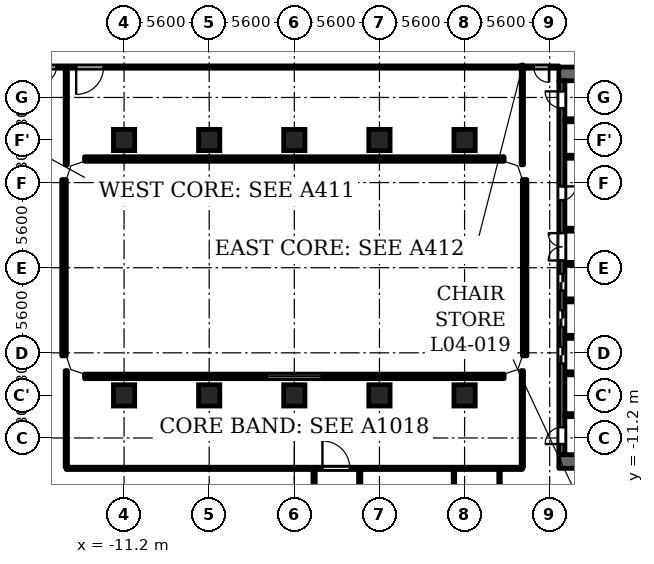
"""IFC4 building model, lengths in metres.
Left out: names, types, materials, properties, quantities, classifications, styles, units other than length and angle.
Written with IfcOpenShell. Run it as: python <this file> out.ifc"""

import sys

from ifc_helpers import new_model, si_unit, direction, frame, frame_2d, origin, origin_2d, place, context, subcontext, project, spatial, polyline, rectangle, outline, extrude, element, fill, save


model = new_model("IFC4")
c1 = context("Model", 3, precision=1e-05, world=origin(), true_north=direction((0.0, 1.0)))
c2 = subcontext(c1, "Body", "Model", "MODEL_VIEW")
j1 = project(units=[si_unit("LENGTHUNIT", "METRE"), si_unit("PLANEANGLEUNIT", "RADIAN")], contexts=[c1])
p1 = place(None, origin())
s1 = spatial("IfcSite", under=j1, at=p1, CompositionType="ELEMENT")
p2 = place(p1, origin())
s2 = spatial("IfcBuilding", under=s1, at=p2, CompositionType="ELEMENT")
p3 = place(p2, frame((0.0, 0.0, 20.9)))
s3 = spatial("IfcBuildingStorey", under=s2, at=p3, CompositionType="ELEMENT", Elevation=20.9)
for number, where, z_axis, x_axis in (
    (1, (-11.2, -8.4, 0.0), (0.0, 0.0, 1.0), (1.0, 0.0, 0.0)),
    (2, (-11.2, 8.4, 0.0), (0.0, 0.0, 1.0), (1.0, 0.0, 0.0)),
    (3, (-5.6, -8.4, 0.0), (0.0, 0.0, 1.0), (1.0, 0.0, 0.0)),
    (4, (-5.6, 8.4, 0.0), (0.0, 0.0, 1.0), (1.0, 0.0, 0.0)),
    (5, (0.0, -8.4, 0.0), (0.0, 0.0, 1.0), (1.0, 0.0, 0.0)),
    (6, (0.0, 8.4, 0.0), (0.0, 0.0, 1.0), (1.0, 0.0, 0.0)),
    (7, (5.6, -8.4, 0.0), (0.0, 0.0, 1.0), (1.0, 0.0, 0.0)),
    (8, (5.6, 8.4, 0.0), (0.0, 0.0, 1.0), (1.0, 0.0, 0.0)),
    (9, (11.2, -8.4, 0.0), (0.0, 0.0, 1.0), (1.0, 0.0, 0.0)),
    (10, (11.2, 8.4, 0.0), (0.0, 0.0, 1.0), (1.0, 0.0, 0.0)),
):
    element("IfcColumn", number, at=place(p3, frame(where, z_axis=z_axis, x_axis=x_axis)), inside=s3, PredefinedType="COLUMN", context=c2, shape_type="SweptSolid", body=[
        extrude(rectangle(XDim=1.4, YDim=1.4, at=origin_2d()), origin(), (0.0, 0.0, 1.0), 4.8),
    ])
p4 = place(p3, frame((-15.15, -5.8, 0.0), z_axis=(0.0, 0.0, 1.0), x_axis=(0.0, 1.0, 0.0)))
e11 = element("IfcWall", 11, at=p4, inside=s3, PredefinedType="SOLIDWALL", context=c2, shape_type="SweptSolid", body=[
    extrude(rectangle(XDim=11.6, YDim=0.3, at=frame_2d((5.8, 0.0))), origin(), (0.0, 0.0, 1.0), 4.45),
])
p5 = place(p3, frame((-13.8, 7.15, 0.0), z_axis=(0.0, 0.0, 1.0), x_axis=(1.0, 0.0, 0.0)))
e12 = element("IfcWall", 12, at=p5, inside=s3, PredefinedType="SOLIDWALL", context=c2, shape_type="SweptSolid", body=[
    extrude(rectangle(XDim=27.6, YDim=0.3, at=frame_2d((13.8, 0.0))), origin(), (0.0, 0.0, 1.0), 4.45),
])
p6 = place(p3, frame((15.15, 5.8, 0.0), z_axis=(0.0, 0.0, 1.0), x_axis=(0.0, -1.0, 0.0)))
e13 = element("IfcWall", 13, at=p6, inside=s3, PredefinedType="SOLIDWALL", context=c2, shape_type="SweptSolid", body=[
    extrude(rectangle(XDim=11.6, YDim=0.3, at=frame_2d((5.8, 0.0))), origin(), (0.0, 0.0, 1.0), 4.45),
])
p7 = place(p3, frame((13.8, -7.15, 0.0), z_axis=(0.0, 0.0, 1.0), x_axis=(-1.0, 0.0, 0.0)))
e14 = element("IfcWall", 14, at=p7, inside=s3, PredefinedType="SOLIDWALL", context=c2, shape_type="SweptSolid", body=[
    extrude(rectangle(XDim=27.6, YDim=0.3, at=frame_2d((13.8, 0.0))), origin(), (0.0, 0.0, 1.0), 4.45),
])
p8 = place(p7, frame((12.0, 0.0, 1.2)))
e15 = element("IfcOpeningElement", 15, at=p8, cuts=e14, PredefinedType="OPENING", context=c2, shape_type="SweptSolid", body=[
    extrude(rectangle(XDim=3.6, YDim=0.95, at=frame_2d((1.8, 0.475))), frame((0.0, 0.16, 0.0), z_axis=(0.0, -1.0, 0.0), x_axis=(1.0, 0.0, 0.0)), (0.0, 0.0, 1.0), 0.32),
])
for number, where, z_axis, x_axis in (
    (16, (17.4, 12.75, 0.0), (0.0, 0.0, 1.0), (1.0, 0.0, 0.0)),
    (17, (17.4, -12.75, 0.0), (0.0, 0.0, 1.0), (1.0, 0.0, 0.0)),
):
    element("IfcWall", number, at=place(p3, frame(where, z_axis=z_axis, x_axis=x_axis)), inside=s3, PredefinedType="SHEAR", context=c2, shape_type="SweptSolid", body=[
        extrude(rectangle(XDim=10.4, YDim=0.9, at=frame_2d((5.2, 0.0))), origin(), (0.0, 0.0, 1.0), 4.45),
    ])
p9 = place(p3, frame((17.6, -12.3, 0.0), z_axis=(0.0, 0.0, 1.0), x_axis=(0.0, 1.0, 0.0)))
e18 = element("IfcWall", 18, at=p9, inside=s3, PredefinedType="SHEAR", context=c2, shape_type="SweptSolid", body=[
    extrude(rectangle(XDim=24.6, YDim=0.4, at=frame_2d((12.3, 0.0))), origin(), (0.0, 0.0, 1.0), 4.45),
])
p10 = place(p9, frame((6.0, 0.0, 0.0)))
e19 = element("IfcOpeningElement", 19, at=p10, cuts=e18, PredefinedType="OPENING", context=c2, shape_type="SweptSolid", body=[
    extrude(rectangle(XDim=1.1, YDim=2.1, at=frame_2d((0.55, 1.05))), frame((0.0, 0.21, 0.0), z_axis=(0.0, -1.0, 0.0), x_axis=(1.0, 0.0, 0.0)), (0.0, 0.0, 1.0), 0.42),
])
p11 = place(p9, frame((8.4, 0.0, 0.0)))
e20 = element("IfcOpeningElement", 20, at=p11, cuts=e18, PredefinedType="OPENING", context=c2, shape_type="SweptSolid", body=[
    extrude(rectangle(XDim=1.1, YDim=2.1, at=frame_2d((0.55, 1.05))), frame((0.0, 0.21, 0.0), z_axis=(0.0, -1.0, 0.0), x_axis=(1.0, 0.0, 0.0)), (0.0, 0.0, 1.0), 0.42),
])
p12 = place(p9, frame((10.8, 0.0, 0.0)))
e21 = element("IfcOpeningElement", 21, at=p12, cuts=e18, PredefinedType="OPENING", context=c2, shape_type="SweptSolid", body=[
    extrude(rectangle(XDim=1.1, YDim=2.1, at=frame_2d((0.55, 1.05))), frame((0.0, 0.21, 0.0), z_axis=(0.0, -1.0, 0.0), x_axis=(1.0, 0.0, 0.0)), (0.0, 0.0, 1.0), 0.42),
])
p13 = place(p9, frame((16.75, 0.0, 0.0)))
e22 = element("IfcOpeningElement", 22, at=p13, cuts=e18, PredefinedType="OPENING", context=c2, shape_type="SweptSolid", body=[
    extrude(rectangle(XDim=0.9, YDim=2.1, at=frame_2d((0.45, 1.05))), frame((0.0, 0.21, 0.0), z_axis=(0.0, -1.0, 0.0), x_axis=(1.0, 0.0, 0.0)), (0.0, 0.0, 1.0), 0.42),
])
p14 = place(p9, frame((22.8, 0.0, 0.0)))
e23 = element("IfcOpeningElement", 23, at=p14, cuts=e18, PredefinedType="OPENING", context=c2, shape_type="SweptSolid", body=[
    extrude(rectangle(XDim=1.1, YDim=2.1, at=frame_2d((0.55, 1.05))), frame((0.0, 0.21, 0.0), z_axis=(0.0, -1.0, 0.0), x_axis=(1.0, 0.0, 0.0)), (0.0, 0.0, 1.0), 0.42),
])
p15 = place(p9, frame((0.7, 0.0, 0.0)))
e24 = element("IfcOpeningElement", 24, at=p15, cuts=e18, PredefinedType="OPENING", context=c2, shape_type="SweptSolid", body=[
    extrude(rectangle(XDim=1.1, YDim=2.1, at=frame_2d((0.55, 1.05))), frame((0.0, 0.21, 0.0), z_axis=(0.0, -1.0, 0.0), x_axis=(1.0, 0.0, 0.0)), (0.0, 0.0, 1.0), 0.42),
])
p16 = place(p9, frame((12.775, 0.0, 0.0)))
e25 = element("IfcOpeningElement", 25, at=p16, cuts=e18, PredefinedType="OPENING", context=c2, shape_type="SweptSolid", body=[
    extrude(rectangle(XDim=1.8, YDim=2.1, at=frame_2d((0.9, 1.05))), frame((0.0, 0.21, 0.0), z_axis=(0.0, -1.0, 0.0), x_axis=(1.0, 0.0, 0.0)), (0.0, 0.0, 1.0), 0.42),
])
p17 = place(p3, frame((17.8, -9.7, 0.0), z_axis=(0.0, 0.0, 1.0), x_axis=(1.0, 0.0, 0.0)))
e26 = element("IfcWall", 26, at=p17, inside=s3, PredefinedType="SHEAR", context=c2, shape_type="SweptSolid", body=[
    extrude(rectangle(XDim=8.3, YDim=0.2, at=frame_2d((4.15, 0.0))), origin(), (0.0, 0.0, 1.0), 4.45),
])
p18 = place(p17, frame((0.85, 0.0, 0.0)))
e27 = element("IfcOpeningElement", 27, at=p18, cuts=e26, PredefinedType="OPENING", context=c2, shape_type="SweptSolid", body=[
    extrude(rectangle(XDim=1.1, YDim=2.1, at=frame_2d((0.55, 1.05))), frame((0.0, 0.11, 0.0), z_axis=(0.0, -1.0, 0.0), x_axis=(1.0, 0.0, 0.0)), (0.0, 0.0, 1.0), 0.22),
])
p19 = place(p17, frame((3.75, 0.0, 0.0)))
e28 = element("IfcOpeningElement", 28, at=p19, cuts=e26, PredefinedType="OPENING", context=c2, shape_type="SweptSolid", body=[
    extrude(rectangle(XDim=1.1, YDim=2.1, at=frame_2d((0.55, 1.05))), frame((0.0, 0.11, 0.0), z_axis=(0.0, -1.0, 0.0), x_axis=(1.0, 0.0, 0.0)), (0.0, 0.0, 1.0), 0.22),
])
for number, where, z_axis, x_axis in (
    (29, (17.8, -6.95, 0.0), (0.0, 0.0, 1.0), (1.0, 0.0, 0.0)),
    (30, (17.8, -4.55, 0.0), (0.0, 0.0, 1.0), (1.0, 0.0, 0.0)),
    (31, (17.8, -2.15, 0.0), (0.0, 0.0, 1.0), (1.0, 0.0, 0.0)),
):
    element("IfcWall", number, at=place(p3, frame(where, z_axis=z_axis, x_axis=x_axis)), inside=s3, PredefinedType="PARTITIONING", context=c2, shape_type="SweptSolid", body=[
        extrude(rectangle(XDim=2.8, YDim=0.2, at=frame_2d((1.4, 0.0))), origin(), (0.0, 0.0, 1.0), 4.45),
    ])
for number, where, z_axis, x_axis in (
    (32, (17.8, 0.25, 0.0), (0.0, 0.0, 1.0), (1.0, 0.0, 0.0)),
    (33, (17.8, 2.5, 0.0), (0.0, 0.0, 1.0), (1.0, 0.0, 0.0)),
):
    element("IfcWall", number, at=place(p3, frame(where, z_axis=z_axis, x_axis=x_axis)), inside=s3, PredefinedType="PARTITIONING", context=c2, shape_type="SweptSolid", body=[
        extrude(rectangle(XDim=3.0, YDim=0.2, at=frame_2d((1.5, 0.0))), origin(), (0.0, 0.0, 1.0), 4.45),
    ])
p20 = place(p3, frame((17.8, 7.3, 0.0), z_axis=(0.0, 0.0, 1.0), x_axis=(1.0, 0.0, 0.0)))
e34 = element("IfcWall", 34, at=p20, inside=s3, PredefinedType="PARTITIONING", context=c2, shape_type="SweptSolid", body=[
    extrude(rectangle(XDim=2.8, YDim=0.2, at=frame_2d((1.4, 0.0))), origin(), (0.0, 0.0, 1.0), 4.45),
])
p21 = place(p3, frame((17.8, 9.7, 0.0), z_axis=(0.0, 0.0, 1.0), x_axis=(1.0, 0.0, 0.0)))
e35 = element("IfcWall", 35, at=p21, inside=s3, PredefinedType="SHEAR", context=c2, shape_type="SweptSolid", body=[
    extrude(rectangle(XDim=8.3, YDim=0.2, at=frame_2d((4.15, 0.0))), origin(), (0.0, 0.0, 1.0), 4.45),
])
p22 = place(p21, frame((0.85, 0.0, 0.0)))
e36 = element("IfcOpeningElement", 36, at=p22, cuts=e35, PredefinedType="OPENING", context=c2, shape_type="SweptSolid", body=[
    extrude(rectangle(XDim=1.1, YDim=2.1, at=frame_2d((0.55, 1.05))), frame((0.0, 0.11, 0.0), z_axis=(0.0, -1.0, 0.0), x_axis=(1.0, 0.0, 0.0)), (0.0, 0.0, 1.0), 0.22),
])
p23 = place(p21, frame((3.75, 0.0, 0.0)))
e37 = element("IfcOpeningElement", 37, at=p23, cuts=e35, PredefinedType="OPENING", context=c2, shape_type="SweptSolid", body=[
    extrude(rectangle(XDim=1.1, YDim=2.1, at=frame_2d((0.55, 1.05))), frame((0.0, 0.11, 0.0), z_axis=(0.0, -1.0, 0.0), x_axis=(1.0, 0.0, 0.0)), (0.0, 0.0, 1.0), 0.22),
])
p24 = place(p3, frame((-15.005, -13.2, 0.0), z_axis=(0.0, 0.0, 1.0), x_axis=(1.0, 0.0, 0.0)))
e38 = element("IfcWall", 38, at=p24, inside=s3, PredefinedType="PARTITIONING", context=c2, shape_type="SweptSolid", body=[
    extrude(rectangle(XDim=30.01, YDim=0.15, at=frame_2d((15.005, 0.0))), origin(), (0.0, 0.0, 1.0), 4.45),
])
p25 = place(p24, frame((16.855, 0.0, 0.0)))
e39 = element("IfcOpeningElement", 39, at=p25, cuts=e38, PredefinedType="OPENING", context=c2, shape_type="SweptSolid", body=[
    extrude(rectangle(XDim=1.8, YDim=2.1, at=frame_2d((0.9, 1.05))), frame((0.0, 0.085, 0.0), z_axis=(0.0, -1.0, 0.0), x_axis=(1.0, 0.0, 0.0)), (0.0, 0.0, 1.0), 0.17),
])
p26 = place(p3, frame((-17.4, 13.2, 0.0), z_axis=(0.0, 0.0, 1.0), x_axis=(1.0, 0.0, 0.0)))
e40 = element("IfcWall", 40, at=p26, inside=s3, PredefinedType="PARTITIONING", context=c2, shape_type="SweptSolid", body=[
    extrude(rectangle(XDim=34.8, YDim=0.15, at=frame_2d((17.4, 0.0))), origin(), (0.0, 0.0, 1.0), 4.45),
])
p27 = place(p26, frame((3.05, 0.0, 0.0)))
e41 = element("IfcOpeningElement", 41, at=p27, cuts=e40, PredefinedType="OPENING", context=c2, shape_type="SweptSolid", body=[
    extrude(rectangle(XDim=1.8, YDim=2.1, at=frame_2d((0.9, 1.05))), frame((0.0, 0.085, 0.0), z_axis=(0.0, -1.0, 0.0), x_axis=(1.0, 0.0, 0.0)), (0.0, 0.0, 1.0), 0.17),
])
p28 = place(p26, frame((0.75, 0.0, 0.0)))
e42 = element("IfcOpeningElement", 42, at=p28, cuts=e40, PredefinedType="OPENING", context=c2, shape_type="SweptSolid", body=[
    extrude(rectangle(XDim=1.0, YDim=2.1, at=frame_2d((0.5, 1.05))), frame((0.0, 0.085, 0.0), z_axis=(0.0, -1.0, 0.0), x_axis=(1.0, 0.0, 0.0)), (0.0, 0.0, 1.0), 0.17),
])
p29 = place(p26, frame((33.15, 0.0, 0.0)))
e43 = element("IfcOpeningElement", 43, at=p29, cuts=e40, PredefinedType="OPENING", context=c2, shape_type="SweptSolid", body=[
    extrude(rectangle(XDim=1.0, YDim=2.1, at=frame_2d((0.5, 1.05))), frame((0.0, 0.085, 0.0), z_axis=(0.0, -1.0, 0.0), x_axis=(1.0, 0.0, 0.0)), (0.0, 0.0, 1.0), 0.17),
])
for number, where, z_axis, x_axis in (
    (44, (-15.0, -13.125, 0.0), (0.0, 0.0, 1.0), (0.0, 1.0, 0.0)),
    (45, (-15.0, 6.769, 0.0), (0.0, 0.0, 1.0), (0.0, 1.0, 0.0)),
):
    element("IfcWall", number, at=place(p3, frame(where, z_axis=z_axis, x_axis=x_axis)), inside=s3, PredefinedType="PARTITIONING", context=c2, shape_type="SweptSolid", body=[
        extrude(rectangle(XDim=6.356, YDim=0.15, at=frame_2d((3.178, 0.0))), origin(), (0.0, 0.0, 1.0), 4.45),
    ])
for number, where, z_axis, x_axis in (
    (46, (1.3, -22.325, 0.0), (0.0, 0.0, 1.0), (0.0, 1.0, 0.0)),
    (47, (4.3, -22.325, 0.0), (0.0, 0.0, 1.0), (0.0, 1.0, 0.0)),
):
    element("IfcWall", number, at=place(p3, frame(where, z_axis=z_axis, x_axis=x_axis)), inside=s3, PredefinedType="PARTITIONING", context=c2, shape_type="SweptSolid", body=[
        extrude(rectangle(XDim=9.05, YDim=0.15, at=frame_2d((4.525, 0.0))), origin(), (0.0, 0.0, 1.0), 4.45),
    ])
for number, where, z_axis, x_axis in (
    (48, (10.5, -22.325, 0.0), (0.0, 0.0, 1.0), (0.0, 1.0, 0.0)),
    (49, (13.5, -22.325, 0.0), (0.0, 0.0, 1.0), (0.0, 1.0, 0.0)),
):
    element("IfcWall", number, at=place(p3, frame(where, z_axis=z_axis, x_axis=x_axis)), inside=s3, PredefinedType="PARTITIONING", context=c2, shape_type="SweptSolid", body=[
        extrude(rectangle(XDim=9.05, YDim=0.1, at=frame_2d((4.525, 0.0))), origin(), (0.0, 0.0, 1.0), 4.45),
    ])
for number, where, z_axis, x_axis in (
    (50, (15.0, -13.125, 0.0), (0.0, 0.0, 1.0), (0.0, 1.0, 0.0)),
    (51, (15.0, 6.769, 0.0), (0.0, 0.0, 1.0), (0.0, 1.0, 0.0)),
):
    element("IfcWall", number, at=place(p3, frame(where, z_axis=z_axis, x_axis=x_axis)), inside=s3, PredefinedType="PARTITIONING", context=c2, shape_type="SweptSolid", body=[
        extrude(rectangle(XDim=6.356, YDim=0.15, at=frame_2d((3.178, 0.0))), origin(), (0.0, 0.0, 1.0), 4.45),
    ])
p30 = place(p3, origin())
e52 = element("IfcWall", 52, at=p30, inside=s3, PredefinedType="SOLIDWALL", context=c2, shape_type="SweptSolid", body=[
    extrude(outline(polyline([(-13.849, 7.3), (-14.937, 6.937), (-15.3, 5.849), (-15.3, 5.8), (-15.0, 5.8), (-14.7, 6.7), (-13.8, 7.0), (-13.8, 7.3), (-13.849, 7.3)])), origin(), (0.0, 0.0, 1.0), 4.45),
])
e53 = element("IfcWall", 53, at=p30, inside=s3, PredefinedType="SOLIDWALL", context=c2, shape_type="SweptSolid", body=[
    extrude(outline(polyline([(14.937, 6.937), (13.849, 7.3), (13.8, 7.3), (13.8, 7.0), (14.7, 6.7), (15.0, 5.8), (15.3, 5.8), (15.3, 5.849), (14.937, 6.937)])), origin(), (0.0, 0.0, 1.0), 4.45),
])
e54 = element("IfcWall", 54, at=p30, inside=s3, PredefinedType="SOLIDWALL", context=c2, shape_type="SweptSolid", body=[
    extrude(outline(polyline([(14.937, -6.937), (15.3, -5.849), (15.3, -5.8), (15.0, -5.8), (14.7, -6.7), (13.8, -7.0), (13.8, -7.3), (13.849, -7.3), (14.937, -6.937)])), origin(), (0.0, 0.0, 1.0), 4.45),
])
e55 = element("IfcWall", 55, at=p30, inside=s3, PredefinedType="SOLIDWALL", context=c2, shape_type="SweptSolid", body=[
    extrude(outline(polyline([(-14.937, -6.937), (-13.849, -7.3), (-13.8, -7.3), (-13.8, -7.0), (-14.7, -6.7), (-15.0, -5.8), (-15.3, -5.8), (-15.3, -5.849), (-14.937, -6.937)])), origin(), (0.0, 0.0, 1.0), 4.45),
])
p31 = place(p10, origin())
e56 = element("IfcDoor", 56, at=p31, inside=s3, OperationType="DOUBLE_DOOR_SLIDING", PredefinedType="DOOR", context=c2, shape_type="SweptSolid", body=[
    extrude(rectangle(XDim=1.1, YDim=2.1, at=frame_2d((0.55, 1.05))), frame((0.0, 0.025, 0.0), z_axis=(0.0, -1.0, 0.0), x_axis=(1.0, 0.0, 0.0)), (0.0, 0.0, 1.0), 0.05),
])
fill(e19, e56)
p32 = place(p11, origin())
e57 = element("IfcDoor", 57, at=p32, inside=s3, OperationType="DOUBLE_DOOR_SLIDING", PredefinedType="DOOR", context=c2, shape_type="SweptSolid", body=[
    extrude(rectangle(XDim=1.1, YDim=2.1, at=frame_2d((0.55, 1.05))), frame((0.0, 0.025, 0.0), z_axis=(0.0, -1.0, 0.0), x_axis=(1.0, 0.0, 0.0)), (0.0, 0.0, 1.0), 0.05),
])
fill(e20, e57)
p33 = place(p12, origin())
e58 = element("IfcDoor", 58, at=p33, inside=s3, OperationType="DOUBLE_DOOR_SLIDING", PredefinedType="DOOR", context=c2, shape_type="SweptSolid", body=[
    extrude(rectangle(XDim=1.1, YDim=2.1, at=frame_2d((0.55, 1.05))), frame((0.0, 0.025, 0.0), z_axis=(0.0, -1.0, 0.0), x_axis=(1.0, 0.0, 0.0)), (0.0, 0.0, 1.0), 0.05),
])
fill(e21, e58)
p34 = place(p13, origin())
e59 = element("IfcDoor", 59, at=p34, inside=s3, OperationType="SINGLE_SWING_RIGHT", PredefinedType="DOOR", context=c2, shape_type="SweptSolid", body=[
    extrude(rectangle(XDim=0.9, YDim=2.1, at=frame_2d((0.45, 1.05))), frame((0.0, 0.025, 0.0), z_axis=(0.0, -1.0, 0.0), x_axis=(1.0, 0.0, 0.0)), (0.0, 0.0, 1.0), 0.05),
])
fill(e22, e59)
p35 = place(p14, origin())
e60 = element("IfcDoor", 60, at=p35, inside=s3, OperationType="SINGLE_SWING_LEFT", PredefinedType="DOOR", context=c2, shape_type="SweptSolid", body=[
    extrude(rectangle(XDim=1.1, YDim=2.1, at=frame_2d((0.55, 1.05))), frame((0.0, 0.025, 0.0), z_axis=(0.0, -1.0, 0.0), x_axis=(1.0, 0.0, 0.0)), (0.0, 0.0, 1.0), 0.05),
])
fill(e23, e60)
p36 = place(p15, origin())
e61 = element("IfcDoor", 61, at=p36, inside=s3, OperationType="SINGLE_SWING_RIGHT", PredefinedType="DOOR", context=c2, shape_type="SweptSolid", body=[
    extrude(rectangle(XDim=1.1, YDim=2.1, at=frame_2d((0.55, 1.05))), frame((0.0, 0.025, 0.0), z_axis=(0.0, -1.0, 0.0), x_axis=(1.0, 0.0, 0.0)), (0.0, 0.0, 1.0), 0.05),
])
fill(e24, e61)
p37 = place(p16, origin())
e62 = element("IfcDoor", 62, at=p37, inside=s3, OperationType="DOUBLE_DOOR_SINGLE_SWING", PredefinedType="DOOR", context=c2, shape_type="SweptSolid", body=[
    extrude(rectangle(XDim=1.8, YDim=2.1, at=frame_2d((0.9, 1.05))), frame((0.0, 0.025, 0.0), z_axis=(0.0, -1.0, 0.0), x_axis=(1.0, 0.0, 0.0)), (0.0, 0.0, 1.0), 0.05),
])
fill(e25, e62)
p38 = place(p27, origin())
e63 = element("IfcDoor", 63, at=p38, inside=s3, OperationType="SINGLE_SWING_LEFT", PredefinedType="DOOR", context=c2, shape_type="SweptSolid", body=[
    extrude(rectangle(XDim=1.8, YDim=2.1, at=frame_2d((0.9, 1.05))), frame((0.0, 0.025, 0.0), z_axis=(0.0, -1.0, 0.0), x_axis=(1.0, 0.0, 0.0)), (0.0, 0.0, 1.0), 0.05),
])
fill(e41, e63)
p39 = place(p28, origin())
e64 = element("IfcDoor", 64, at=p39, inside=s3, OperationType="SINGLE_SWING_LEFT", PredefinedType="DOOR", context=c2, shape_type="SweptSolid", body=[
    extrude(rectangle(XDim=1.0, YDim=2.1, at=frame_2d((0.5, 1.05))), frame((0.0, 0.025, 0.0), z_axis=(0.0, -1.0, 0.0), x_axis=(1.0, 0.0, 0.0)), (0.0, 0.0, 1.0), 0.05),
])
fill(e42, e64)
p40 = place(p29, origin())
e65 = element("IfcDoor", 65, at=p40, inside=s3, OperationType="SINGLE_SWING_RIGHT", PredefinedType="DOOR", context=c2, shape_type="SweptSolid", body=[
    extrude(rectangle(XDim=1.0, YDim=2.1, at=frame_2d((0.5, 1.05))), frame((0.0, 0.025, 0.0), z_axis=(0.0, -1.0, 0.0), x_axis=(1.0, 0.0, 0.0)), (0.0, 0.0, 1.0), 0.05),
])
fill(e43, e65)
p41 = place(p25, origin())
e66 = element("IfcDoor", 66, at=p41, inside=s3, OperationType="SINGLE_SWING_RIGHT", PredefinedType="DOOR", context=c2, shape_type="SweptSolid", body=[
    extrude(rectangle(XDim=1.8, YDim=2.1, at=frame_2d((0.9, 1.05))), frame((0.0, 0.025, 0.0), z_axis=(0.0, -1.0, 0.0), x_axis=(1.0, 0.0, 0.0)), (0.0, 0.0, 1.0), 0.05),
])
fill(e39, e66)
p42 = place(p8, origin())
e67 = element("IfcWindow", 67, at=p42, inside=s3, PartitioningType="SINGLE_PANEL", PredefinedType="WINDOW", context=c2, shape_type="SweptSolid", body=[
    extrude(rectangle(XDim=3.6, YDim=0.95, at=frame_2d((1.8, 0.475))), frame((0.0, 0.03, 0.0), z_axis=(0.0, -1.0, 0.0), x_axis=(1.0, 0.0, 0.0)), (0.0, 0.0, 1.0), 0.06),
])
fill(e15, e67)
save(model, sys.argv[1])
